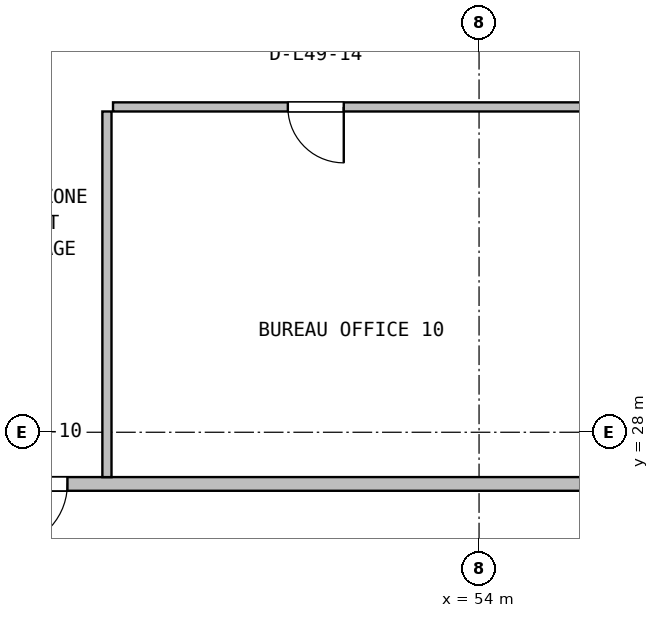
"""IFC4 building model, lengths in metres.
Left out: names, types, materials, properties, quantities, classifications, styles, units other than length and angle.
Written with IfcOpenShell. Run it as: python <this file> out.ifc"""

import sys

from ifc_helpers import new_model, si_unit, direction, frame, frame_2d, origin, place, context, subcontext, project, spatial, rectangle, extrude, source, transform, mapped, element, fill, save


model = new_model("IFC4")
c1 = context("Model", 3, precision=1e-05, world=origin(), true_north=direction((0.0, 1.0)))
c2 = subcontext(c1, "Body", "Model", "MODEL_VIEW")
j1 = project(units=[si_unit("LENGTHUNIT", "METRE"), si_unit("PLANEANGLEUNIT", "RADIAN")], contexts=[c1])
p1 = place(None, origin())
s1 = spatial("IfcSite", under=j1, at=p1, CompositionType="ELEMENT")
p2 = place(p1, origin())
s2 = spatial("IfcBuilding", under=s1, at=p2, CompositionType="ELEMENT")
p3 = place(p2, frame((0.0, 0.0, 199.8)))
s3 = spatial("IfcBuildingStorey", under=s2, at=p3, CompositionType="ELEMENT", Elevation=199.8)
p4 = place(p3, frame((9.68, 27.15, 0.0), z_axis=(0.0, 0.0, 1.0), x_axis=(1.0, 0.0, 0.0)))
e1 = element("IfcWall", 1, at=p4, inside=s3, PredefinedType="PARTITIONING", context=c2, shape_type="SweptSolid", body=[
    extrude(rectangle(XDim=48.64, YDim=0.225, at=frame_2d((24.32, 0.0))), origin(), (0.0, 0.0, 1.0), 2.908),
])
p5 = place(p4, frame((18.495, 0.0, 0.0)))
e2 = element("IfcOpeningElement", 2, at=p5, cuts=e1, PredefinedType="OPENING", context=c2, shape_type="SweptSolid", body=[
    extrude(rectangle(XDim=1.4, YDim=2.12, at=frame_2d((0.7, 1.06))), frame((0.0, 0.123, 0.0), z_axis=(0.0, -1.0, 0.0), x_axis=(1.0, 0.0, 0.0)), (0.0, 0.0, 1.0), 0.245),
])
p6 = place(p4, frame((22.26, 0.0, 0.0)))
e3 = element("IfcOpeningElement", 3, at=p6, cuts=e1, PredefinedType="OPENING", context=c2, shape_type="SweptSolid", body=[
    extrude(rectangle(XDim=0.88, YDim=2.06, at=frame_2d((0.44, 1.03))), frame((0.0, 0.123, 0.0), z_axis=(0.0, -1.0, 0.0), x_axis=(1.0, 0.0, 0.0)), (0.0, 0.0, 1.0), 0.245),
])
p7 = place(p4, frame((25.865, 0.0, 0.0)))
e4 = element("IfcOpeningElement", 4, at=p7, cuts=e1, PredefinedType="OPENING", context=c2, shape_type="SweptSolid", body=[
    extrude(rectangle(XDim=0.92, YDim=2.08, at=frame_2d((0.46, 1.04))), frame((0.0, 0.123, 0.0), z_axis=(0.0, -1.0, 0.0), x_axis=(1.0, 0.0, 0.0)), (0.0, 0.0, 1.0), 0.245),
])
p8 = place(p4, frame((28.905, 0.0, 0.0)))
e5 = element("IfcOpeningElement", 5, at=p8, cuts=e1, PredefinedType="OPENING", context=c2, shape_type="SweptSolid", body=[
    extrude(rectangle(XDim=1.0, YDim=2.1, at=frame_2d((0.5, 1.05))), frame((0.0, 0.123, 0.0), z_axis=(0.0, -1.0, 0.0), x_axis=(1.0, 0.0, 0.0)), (0.0, 0.0, 1.0), 0.245),
])
p9 = place(p4, frame((32.995, 0.0, 0.0)))
e6 = element("IfcOpeningElement", 6, at=p9, cuts=e1, PredefinedType="OPENING", context=c2, shape_type="SweptSolid", body=[
    extrude(rectangle(XDim=1.05, YDim=2.1, at=frame_2d((0.525, 1.05))), frame((0.0, 0.123, 0.0), z_axis=(0.0, -1.0, 0.0), x_axis=(1.0, 0.0, 0.0)), (0.0, 0.0, 1.0), 0.245),
])
p10 = place(p4, frame((36.5, 0.0, 0.0)))
e7 = element("IfcOpeningElement", 7, at=p10, cuts=e1, PredefinedType="OPENING", context=c2, shape_type="SweptSolid", body=[
    extrude(rectangle(XDim=1.05, YDim=2.1, at=frame_2d((0.525, 1.05))), frame((0.0, 0.123, 0.0), z_axis=(0.0, -1.0, 0.0), x_axis=(1.0, 0.0, 0.0)), (0.0, 0.0, 1.0), 0.245),
])
p11 = place(p3, frame((47.98, 33.35, 0.0), z_axis=(0.0, 0.0, 1.0), x_axis=(1.0, 0.0, 0.0)))
e8 = element("IfcWall", 8, at=p11, inside=s3, PredefinedType="PARTITIONING", context=c2, shape_type="SweptSolid", body=[
    extrude(rectangle(XDim=10.34, YDim=0.15, at=frame_2d((5.17, 0.0))), origin(), (0.0, 0.0, 1.0), 3.171),
])
p12 = place(p11, frame((2.875, 0.0, 0.0)))
e9 = element("IfcOpeningElement", 9, at=p12, cuts=e8, PredefinedType="OPENING", context=c2, shape_type="SweptSolid", body=[
    extrude(rectangle(XDim=0.92, YDim=2.08, at=frame_2d((0.46, 1.04))), frame((0.0, 0.085, 0.0), z_axis=(0.0, -1.0, 0.0), x_axis=(1.0, 0.0, 0.0)), (0.0, 0.0, 1.0), 0.17),
])
p13 = place(p3, frame((47.88, 27.262, 0.0), z_axis=(0.0, 0.0, 1.0), x_axis=(0.0, 1.0, 0.0)))
e10 = element("IfcWall", 10, at=p13, inside=s3, PredefinedType="PARTITIONING", context=c2, shape_type="SweptSolid", body=[
    extrude(rectangle(XDim=6.013, YDim=0.15, at=frame_2d((3.006, 0.0))), origin(), (0.0, 0.0, 1.0), 3.222),
])
m1 = source(origin(), c2, "Body", "SweptSolid", [
    extrude(rectangle(XDim=1.05, YDim=2.1, at=frame_2d((0.525, 1.05))), frame((0.0, 0.025, 0.0), z_axis=(0.0, -1.0, 0.0), x_axis=(1.0, 0.0, 0.0)), (0.0, 0.0, 1.0), 0.05),
])
p14 = place(p10, frame((1.05, 0.0, 0.0), z_axis=(0.0, 0.0, 1.0), x_axis=(-1.0, 0.0, 0.0)))
e11 = element("IfcDoor", 11, at=p14, inside=s3, OperationType="SINGLE_SWING_LEFT", PredefinedType="DOOR", context=c2, shape_type="MappedRepresentation", body=[
    mapped(m1, transform((0.0, 0.0, 0.0), x_axis=(1.0, 0.0, 0.0), y_axis=(0.0, 1.0, 0.0), z_axis=(0.0, 0.0, 1.0), scale=1.0)),
])
fill(e7, e11)
m2 = source(origin(), c2, "Body", "SweptSolid", [
    extrude(rectangle(XDim=0.92, YDim=2.08, at=frame_2d((0.46, 1.04))), frame((0.0, 0.025, 0.0), z_axis=(0.0, -1.0, 0.0), x_axis=(1.0, 0.0, 0.0)), (0.0, 0.0, 1.0), 0.05),
])
p15 = place(p12, frame((0.92, 0.0, 0.0), z_axis=(0.0, 0.0, 1.0), x_axis=(-1.0, 0.0, 0.0)))
e12 = element("IfcDoor", 12, at=p15, inside=s3, OperationType="SINGLE_SWING_RIGHT", PredefinedType="DOOR", context=c2, shape_type="MappedRepresentation", body=[
    mapped(m2, transform((0.0, 0.0, 0.0), x_axis=(1.0, 0.0, 0.0), y_axis=(0.0, 1.0, 0.0), z_axis=(0.0, 0.0, 1.0), scale=1.0)),
])
fill(e9, e12)
save(model, sys.argv[1])
